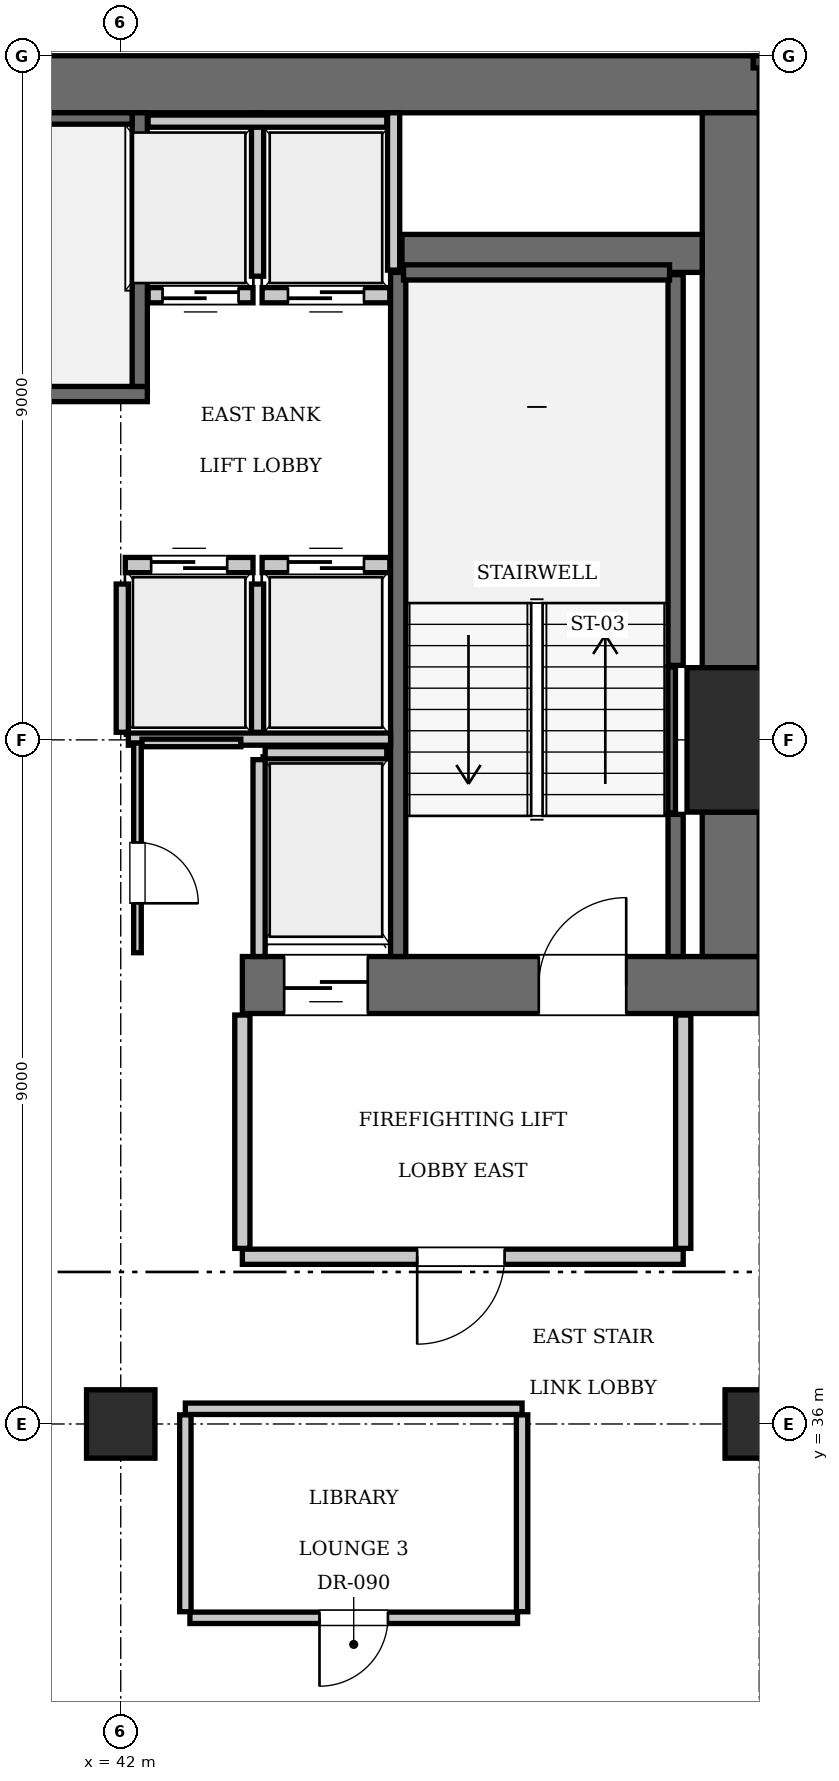
"""IFC4 building model, lengths in metres.
Left out: names, types, materials, properties, quantities, classifications, styles, units other than length and angle.
Written with IfcOpenShell. Run it as: python <this file> out.ifc"""

import sys

from ifc_helpers import new_model, si_unit, direction, frame, frame_2d, origin, origin_2d, place, context, subcontext, project, spatial, rectangle, extrude, element, fill, save


model = new_model("IFC4")
c1 = context("Model", 3, precision=1e-05, world=origin(), true_north=direction((0.0, 1.0)))
c2 = subcontext(c1, "Body", "Model", "MODEL_VIEW")
j1 = project(units=[si_unit("LENGTHUNIT", "METRE"), si_unit("PLANEANGLEUNIT", "RADIAN")], contexts=[c1])
p1 = place(None, origin())
s1 = spatial("IfcSite", under=j1, at=p1, CompositionType="ELEMENT")
p2 = place(p1, origin())
s2 = spatial("IfcBuilding", under=s1, at=p2, CompositionType="ELEMENT")
p3 = place(p2, frame((0.0, 0.0, 189.0)))
s3 = spatial("IfcBuildingStorey", under=s2, at=p3, CompositionType="ELEMENT", Elevation=189.0)
p4 = place(p3, frame((50.4, 45.0, 0.0), z_axis=(0.0, 0.0, 1.0), x_axis=(1.0, 0.0, 0.0)))
e1 = element("IfcColumn", 1, at=p4, inside=s3, PredefinedType="COLUMN", context=c2, shape_type="SweptSolid", body=[
    extrude(rectangle(XDim=1.9, YDim=1.9, at=origin_2d()), origin(), (0.0, 0.0, 1.0), 3.85),
])
p5 = place(p3, frame((25.2, 53.625, 0.0), z_axis=(0.0, 0.0, 1.0), x_axis=(1.0, 0.0, 0.0)))
e2 = element("IfcWall", 2, at=p5, inside=s3, PredefinedType="SHEAR", context=c2, shape_type="SweptSolid", body=[
    extrude(rectangle(XDim=25.2, YDim=0.75, at=frame_2d((12.6, 0.0))), origin(), (0.0, 0.0, 1.0), 3.85),
])
p6 = place(p3, frame((43.6, 41.775, 0.0), z_axis=(0.0, 0.0, 1.0), x_axis=(1.0, 0.0, 0.0)))
e3 = element("IfcWall", 3, at=p6, inside=s3, PredefinedType="SHEAR", context=c2, shape_type="SweptSolid", body=[
    extrude(rectangle(XDim=6.8, YDim=0.75, at=frame_2d((3.4, 0.0))), origin(), (0.0, 0.0, 1.0), 3.85),
])
p7 = place(p6, frame((3.9, 0.0, 0.0)))
e4 = element("IfcOpeningElement", 4, at=p7, cuts=e3, PredefinedType="OPENING", context=c2, shape_type="SweptSolid", body=[
    extrude(rectangle(XDim=1.15, YDim=2.15, at=frame_2d((0.575, 1.075))), frame((0.0, 0.385, 0.0), z_axis=(0.0, -1.0, 0.0), x_axis=(1.0, 0.0, 0.0)), (0.0, 0.0, 1.0), 0.77),
])
p8 = place(p6, frame((0.55, 0.0, 0.0)))
e5 = element("IfcOpeningElement", 5, at=p8, cuts=e3, PredefinedType="OPENING", context=c2, shape_type="SweptSolid", body=[
    extrude(rectangle(XDim=1.1, YDim=2.2, at=frame_2d((0.55, 1.1))), frame((0.0, 0.385, 0.0), z_axis=(0.0, -1.0, 0.0), x_axis=(1.0, 0.0, 0.0)), (0.0, 0.0, 1.0), 0.77),
])
p9 = place(p3, frame((50.025, 42.15, 0.0), z_axis=(0.0, 0.0, 1.0), x_axis=(0.0, 1.0, 0.0)))
e6 = element("IfcWall", 6, at=p9, inside=s3, PredefinedType="SHEAR", context=c2, shape_type="SweptSolid", body=[
    extrude(rectangle(XDim=1.9, YDim=0.75, at=frame_2d((0.95, 0.0))), origin(), (0.0, 0.0, 1.0), 3.85),
])
p10 = place(p3, frame((50.025, 45.95, 0.0), z_axis=(0.0, 0.0, 1.0), x_axis=(0.0, 1.0, 0.0)))
e7 = element("IfcWall", 7, at=p10, inside=s3, PredefinedType="SHEAR", context=c2, shape_type="SweptSolid", body=[
    extrude(rectangle(XDim=7.3, YDim=0.75, at=frame_2d((3.65, 0.0))), origin(), (0.0, 0.0, 1.0), 3.85),
])
p11 = place(p3, frame((45.7, 51.4, 0.0), z_axis=(0.0, 0.0, 1.0), x_axis=(1.0, 0.0, 0.0)))
e8 = element("IfcWall", 8, at=p11, inside=s3, PredefinedType="SHEAR", context=c2, shape_type="SweptSolid", body=[
    extrude(rectangle(XDim=3.95, YDim=0.5, at=frame_2d((1.975, 0.0))), origin(), (0.0, 0.0, 1.0), 3.85),
])
for number, where, z_axis, x_axis in (
    (9, (42.0, 36.0, 0.0), (0.0, 0.0, 1.0), (1.0, 0.0, 0.0)),
    (10, (50.4, 36.0, 0.0), (0.0, 0.0, 1.0), (1.0, 0.0, 0.0)),
):
    element("IfcColumn", number, at=place(p3, frame(where, z_axis=z_axis, x_axis=x_axis)), inside=s3, PredefinedType="COLUMN", context=c2, shape_type="SweptSolid", body=[
        extrude(rectangle(XDim=0.9, YDim=0.9, at=origin_2d()), origin(), (0.0, 0.0, 1.0), 3.85),
    ])
p12 = place(p3, frame((33.25, 49.55, 0.0), z_axis=(0.0, 0.0, 1.0), x_axis=(1.0, 0.0, 0.0)))
e11 = element("IfcWall", 11, at=p12, inside=s3, PredefinedType="SOLIDWALL", context=c2, shape_type="SweptSolid", body=[
    extrude(rectangle(XDim=9.1, YDim=0.2, at=frame_2d((4.55, 0.0))), origin(), (0.0, 0.0, 1.0), 3.61),
])
p13 = place(p3, frame((42.25, 49.65, 0.0), z_axis=(0.0, 0.0, 1.0), x_axis=(0.0, 1.0, 0.0)))
e12 = element("IfcWall", 12, at=p13, inside=s3, PredefinedType="SOLIDWALL", context=c2, shape_type="SweptSolid", body=[
    extrude(rectangle(XDim=3.6, YDim=0.2, at=frame_2d((1.8, 0.0))), origin(), (0.0, 0.0, 1.0), 3.61),
])
p14 = place(p3, frame((33.45, 53.175, 0.0), z_axis=(0.0, 0.0, 1.0), x_axis=(1.0, 0.0, 0.0)))
e13 = element("IfcWall", 13, at=p14, inside=s3, PredefinedType="SOLIDWALL", context=c2, shape_type="SweptSolid", body=[
    extrude(rectangle(XDim=8.7, YDim=0.15, at=frame_2d((4.35, 0.0))), origin(), (0.0, 0.0, 1.0), 3.61),
])
p15 = place(p3, frame((45.65, 42.15, 0.0), z_axis=(0.0, 0.0, 1.0), x_axis=(0.0, 1.0, 0.0)))
e14 = element("IfcWall", 14, at=p15, inside=s3, PredefinedType="SOLIDWALL", context=c2, shape_type="SweptSolid", body=[
    extrude(rectangle(XDim=9.0, YDim=0.2, at=frame_2d((4.5, 0.0))), origin(), (0.0, 0.0, 1.0), 3.61),
])
p16 = place(p3, frame((49.3, 42.15, 0.0), z_axis=(0.0, 0.0, 1.0), x_axis=(0.0, 1.0, 0.0)))
e15 = element("IfcWall", 15, at=p16, inside=s3, PredefinedType="SOLIDWALL", context=c2, shape_type="SweptSolid", body=[
    extrude(rectangle(XDim=1.87, YDim=0.2, at=frame_2d((0.935, 0.0))), origin(), (0.0, 0.0, 1.0), 3.61),
])
p17 = place(p3, frame((49.3, 45.98, 0.0), z_axis=(0.0, 0.0, 1.0), x_axis=(0.0, 1.0, 0.0)))
e16 = element("IfcWall", 16, at=p17, inside=s3, PredefinedType="SOLIDWALL", context=c2, shape_type="SweptSolid", body=[
    extrude(rectangle(XDim=5.14, YDim=0.2, at=frame_2d((2.57, 0.0))), origin(), (0.0, 0.0, 1.0), 3.61),
])
p18 = place(p3, frame((45.72, 51.15, 0.0), z_axis=(0.0, 0.0, 1.0), x_axis=(1.0, 0.0, 0.0)))
e17 = element("IfcWall", 17, at=p18, inside=s3, PredefinedType="SOLIDWALL", context=c2, shape_type="SweptSolid", body=[
    extrude(rectangle(XDim=3.5, YDim=0.2, at=frame_2d((1.75, 0.0))), origin(), (0.0, 0.0, 1.0), 3.61),
])
p19 = place(p3, frame((49.248, 44.04, 0.0), z_axis=(0.0, 0.0, 1.0), x_axis=(0.0, 1.0, 0.0)))
e18 = element("IfcWall", 18, at=p19, inside=s3, PredefinedType="SOLIDWALL", context=c2, shape_type="SweptSolid", body=[
    extrude(rectangle(XDim=1.92, YDim=0.1, at=frame_2d((0.96, 0.0))), origin(), (0.0, 0.0, 1.0), 3.61),
])
p20 = place(p3, frame((42.06, 47.3, 0.0), z_axis=(0.0, 0.0, 1.0), x_axis=(1.0, 0.0, 0.0)))
e19 = element("IfcWall", 19, at=p20, inside=s3, PredefinedType="SOLIDWALL", context=c2, shape_type="SweptSolid", body=[
    extrude(rectangle(XDim=1.68, YDim=0.2, at=frame_2d((0.84, 0.0))), origin(), (0.0, 0.0, 1.0), 3.61),
])
p21 = place(p20, frame((0.34, 0.0, 0.0)))
e20 = element("IfcOpeningElement", 20, at=p21, cuts=e19, PredefinedType="OPENING", context=c2, shape_type="SweptSolid", body=[
    extrude(rectangle(XDim=1.0, YDim=2.15, at=frame_2d((0.5, 1.075))), frame((0.0, 0.11, 0.0), z_axis=(0.0, -1.0, 0.0), x_axis=(1.0, 0.0, 0.0)), (0.0, 0.0, 1.0), 0.22),
])
p22 = place(p3, frame((43.86, 47.3, 0.0), z_axis=(0.0, 0.0, 1.0), x_axis=(1.0, 0.0, 0.0)))
e21 = element("IfcWall", 21, at=p22, inside=s3, PredefinedType="SOLIDWALL", context=c2, shape_type="SweptSolid", body=[
    extrude(rectangle(XDim=1.68, YDim=0.2, at=frame_2d((0.84, 0.0))), origin(), (0.0, 0.0, 1.0), 3.61),
])
p23 = place(p22, frame((0.34, 0.0, 0.0)))
e22 = element("IfcOpeningElement", 22, at=p23, cuts=e21, PredefinedType="OPENING", context=c2, shape_type="SweptSolid", body=[
    extrude(rectangle(XDim=1.0, YDim=2.15, at=frame_2d((0.5, 1.075))), frame((0.0, 0.11, 0.0), z_axis=(0.0, -1.0, 0.0), x_axis=(1.0, 0.0, 0.0)), (0.0, 0.0, 1.0), 0.22),
])
p24 = place(p3, frame((42.36, 50.85, 0.0), z_axis=(0.0, 0.0, 1.0), x_axis=(1.0, 0.0, 0.0)))
e23 = element("IfcWall", 23, at=p24, inside=s3, PredefinedType="SOLIDWALL", context=c2, shape_type="SweptSolid", body=[
    extrude(rectangle(XDim=1.38, YDim=0.2, at=frame_2d((0.69, 0.0))), origin(), (0.0, 0.0, 1.0), 3.61),
])
p25 = place(p24, frame((0.19, 0.0, 0.0)))
e24 = element("IfcOpeningElement", 24, at=p25, cuts=e23, PredefinedType="OPENING", context=c2, shape_type="SweptSolid", body=[
    extrude(rectangle(XDim=1.0, YDim=2.15, at=frame_2d((0.5, 1.075))), frame((0.0, 0.11, 0.0), z_axis=(0.0, -1.0, 0.0), x_axis=(1.0, 0.0, 0.0)), (0.0, 0.0, 1.0), 0.22),
])
p26 = place(p3, frame((43.86, 50.85, 0.0), z_axis=(0.0, 0.0, 1.0), x_axis=(1.0, 0.0, 0.0)))
e25 = element("IfcWall", 25, at=p26, inside=s3, PredefinedType="SOLIDWALL", context=c2, shape_type="SweptSolid", body=[
    extrude(rectangle(XDim=1.68, YDim=0.2, at=frame_2d((0.84, 0.0))), origin(), (0.0, 0.0, 1.0), 3.61),
])
p27 = place(p26, frame((0.34, 0.0, 0.0)))
e26 = element("IfcOpeningElement", 26, at=p27, cuts=e25, PredefinedType="OPENING", context=c2, shape_type="SweptSolid", body=[
    extrude(rectangle(XDim=1.0, YDim=2.15, at=frame_2d((0.5, 1.075))), frame((0.0, 0.11, 0.0), z_axis=(0.0, -1.0, 0.0), x_axis=(1.0, 0.0, 0.0)), (0.0, 0.0, 1.0), 0.22),
])
p28 = place(p3, frame((43.9, 44.83, 0.0), z_axis=(0.0, 0.0, 1.0), x_axis=(1.0, 0.0, 0.0)))
e27 = element("IfcWall", 27, at=p28, inside=s3, PredefinedType="SOLIDWALL", context=c2, shape_type="SweptSolid", body=[
    extrude(rectangle(XDim=1.6, YDim=0.16, at=frame_2d((0.8, 0.0))), origin(), (0.0, 0.0, 1.0), 3.61),
])
p29 = place(p3, frame((43.82, 42.15, 0.0), z_axis=(0.0, 0.0, 1.0), x_axis=(0.0, 1.0, 0.0)))
e28 = element("IfcWall", 28, at=p29, inside=s3, PredefinedType="SOLIDWALL", context=c2, shape_type="SweptSolid", body=[
    extrude(rectangle(XDim=2.59, YDim=0.16, at=frame_2d((1.295, 0.0))), origin(), (0.0, 0.0, 1.0), 3.61),
])
for number, where, z_axis, x_axis in (
    (29, (42.02, 45.1, 0.0), (0.0, 0.0, 1.0), (0.0, 1.0, 0.0)),
    (30, (43.8, 45.1, 0.0), (0.0, 0.0, 1.0), (0.0, 1.0, 0.0)),
):
    element("IfcWall", number, at=place(p3, frame(where, z_axis=z_axis, x_axis=x_axis)), inside=s3, PredefinedType="SOLIDWALL", context=c2, shape_type="SweptSolid", body=[
        extrude(rectangle(XDim=1.95, YDim=0.16, at=frame_2d((0.975, 0.0))), origin(), (0.0, 0.0, 1.0), 3.61),
    ])
p30 = place(p3, frame((42.1, 45.01, 0.0), z_axis=(0.0, 0.0, 1.0), x_axis=(1.0, 0.0, 0.0)))
e31 = element("IfcWall", 31, at=p30, inside=s3, PredefinedType="SOLIDWALL", context=c2, shape_type="SweptSolid", body=[
    extrude(rectangle(XDim=3.45, YDim=0.16, at=frame_2d((1.725, 0.0))), origin(), (0.0, 0.0, 1.0), 3.61),
])
p31 = place(p3, frame((45.59, 51.18, 0.0), z_axis=(0.0, 0.0, 1.0), x_axis=(0.0, 1.0, 0.0)))
e32 = element("IfcWall", 32, at=p31, inside=s3, PredefinedType="SOLIDWALL", context=c2, shape_type="SweptSolid", body=[
    extrude(rectangle(XDim=2.07, YDim=0.16, at=frame_2d((1.035, 0.0))), origin(), (0.0, 0.0, 1.0), 3.61),
])
p32 = place(p3, frame((43.8, 51.1, 0.0), z_axis=(0.0, 0.0, 1.0), x_axis=(0.0, 1.0, 0.0)))
e33 = element("IfcWall", 33, at=p32, inside=s3, PredefinedType="SOLIDWALL", context=c2, shape_type="SweptSolid", body=[
    extrude(rectangle(XDim=2.15, YDim=0.16, at=frame_2d((1.075, 0.0))), origin(), (0.0, 0.0, 1.0), 3.61),
])
p33 = place(p3, frame((42.36, 53.14, 0.0), z_axis=(0.0, 0.0, 1.0), x_axis=(1.0, 0.0, 0.0)))
e34 = element("IfcWall", 34, at=p33, inside=s3, PredefinedType="SOLIDWALL", context=c2, shape_type="SweptSolid", body=[
    extrude(rectangle(XDim=3.14, YDim=0.16, at=frame_2d((1.57, 0.0))), origin(), (0.0, 0.0, 1.0), 3.61),
])
p34 = place(p3, frame((43.6, 38.2, 0.0), z_axis=(0.0, 0.0, 1.0), x_axis=(1.0, 0.0, 0.0)))
e35 = element("IfcWall", 35, at=p34, inside=s3, PredefinedType="PARTITIONING", context=c2, shape_type="SweptSolid", body=[
    extrude(rectangle(XDim=5.8, YDim=0.2, at=frame_2d((2.9, 0.0))), origin(), (0.0, 0.0, 1.0), 3.61),
])
p35 = place(p34, frame((2.3, 0.0, 0.0)))
e36 = element("IfcOpeningElement", 36, at=p35, cuts=e35, PredefinedType="OPENING", context=c2, shape_type="SweptSolid", body=[
    extrude(rectangle(XDim=1.15, YDim=2.15, at=frame_2d((0.575, 1.075))), frame((0.0, 0.11, 0.0), z_axis=(0.0, -1.0, 0.0), x_axis=(1.0, 0.0, 0.0)), (0.0, 0.0, 1.0), 0.22),
])
for number, where, z_axis, x_axis in (
    (37, (43.6, 38.31, 0.0), (0.0, 0.0, 1.0), (0.0, 1.0, 0.0)),
    (38, (49.4, 38.31, 0.0), (0.0, 0.0, 1.0), (0.0, 1.0, 0.0)),
):
    element("IfcWall", number, at=place(p3, frame(where, z_axis=z_axis, x_axis=x_axis)), inside=s3, PredefinedType="PARTITIONING", context=c2, shape_type="SweptSolid", body=[
        extrude(rectangle(XDim=3.07, YDim=0.2, at=frame_2d((1.535, 0.0))), origin(), (0.0, 0.0, 1.0), 3.61),
    ])
p36 = place(p3, frame((42.22, 42.2, 0.0), z_axis=(0.0, 0.0, 1.0), x_axis=(0.0, 1.0, 0.0)))
e39 = element("IfcWall", 39, at=p36, inside=s3, PredefinedType="PARTITIONING", context=c2, shape_type="SweptSolid", body=[
    extrude(rectangle(XDim=2.76, YDim=0.1, at=frame_2d((1.38, 0.0))), origin(), (0.0, 0.0, 1.0), 3.61),
])
p37 = place(p36, frame((0.65, 0.0, 0.0)))
e40 = element("IfcOpeningElement", 40, at=p37, cuts=e39, PredefinedType="OPENING", context=c2, shape_type="SweptSolid", body=[
    extrude(rectangle(XDim=0.8, YDim=2.05, at=frame_2d((0.4, 1.025))), frame((0.0, 0.06, 0.0), z_axis=(0.0, -1.0, 0.0), x_axis=(1.0, 0.0, 0.0)), (0.0, 0.0, 1.0), 0.12),
])
p38 = place(p3, frame((42.28, 44.96, 0.0), z_axis=(0.0, 0.0, 1.0), x_axis=(1.0, 0.0, 0.0)))
e41 = element("IfcWall", 41, at=p38, inside=s3, PredefinedType="PARTITIONING", context=c2, shape_type="SweptSolid", body=[
    extrude(rectangle(XDim=1.3, YDim=0.1, at=frame_2d((0.65, 0.0))), origin(), (0.0, 0.0, 1.0), 3.61),
])
p39 = place(p3, frame((42.85, 36.2, 0.0), z_axis=(0.0, 0.0, 1.0), x_axis=(1.0, 0.0, 0.0)))
e42 = element("IfcWall", 42, at=p39, inside=s3, PredefinedType="PARTITIONING", context=c2, shape_type="SweptSolid", body=[
    extrude(rectangle(XDim=4.43, YDim=0.15, at=frame_2d((2.215, 0.0))), origin(), (0.0, 0.0, 1.0), 3.61),
])
for number, where, z_axis, x_axis in (
    (43, (42.85, 33.53, 0.0), (0.0, 0.0, 1.0), (0.0, 1.0, 0.0)),
    (44, (47.28, 33.53, 0.0), (0.0, 0.0, 1.0), (0.0, 1.0, 0.0)),
):
    element("IfcWall", number, at=place(p3, frame(where, z_axis=z_axis, x_axis=x_axis)), inside=s3, PredefinedType="PARTITIONING", context=c2, shape_type="SweptSolid", body=[
        extrude(rectangle(XDim=2.59, YDim=0.15, at=frame_2d((1.295, 0.0))), origin(), (0.0, 0.0, 1.0), 3.61),
    ])
p40 = place(p3, frame((42.91, 33.45, 0.0), z_axis=(0.0, 0.0, 1.0), x_axis=(1.0, 0.0, 0.0)))
e45 = element("IfcWall", 45, at=p40, inside=s3, PredefinedType="PARTITIONING", context=c2, shape_type="SweptSolid", body=[
    extrude(rectangle(XDim=4.31, YDim=0.15, at=frame_2d((2.155, 0.0))), origin(), (0.0, 0.0, 1.0), 3.61),
])
p41 = place(p40, frame((1.705, 0.0, 0.0)))
e46 = element("IfcOpeningElement", 46, at=p41, cuts=e45, PredefinedType="OPENING", context=c2, shape_type="SweptSolid", body=[
    extrude(rectangle(XDim=0.9, YDim=2.1, at=frame_2d((0.45, 1.05))), frame((0.0, 0.085, 0.0), z_axis=(0.0, -1.0, 0.0), x_axis=(1.0, 0.0, 0.0)), (0.0, 0.0, 1.0), 0.17),
])
p42 = place(p7, origin())
e47 = element("IfcDoor", 47, at=p42, inside=s3, OperationType="SINGLE_SWING_RIGHT", PredefinedType="DOOR", context=c2, shape_type="SweptSolid", body=[
    extrude(rectangle(XDim=1.15, YDim=2.15, at=frame_2d((0.575, 1.075))), frame((0.0, 0.025, 0.0), z_axis=(0.0, -1.0, 0.0), x_axis=(1.0, 0.0, 0.0)), (0.0, 0.0, 1.0), 0.05),
])
fill(e4, e47)
p43 = place(p21, origin())
e48 = element("IfcDoor", 48, at=p43, inside=s3, OperationType="SLIDING_TO_LEFT", PredefinedType="DOOR", context=c2, shape_type="SweptSolid", body=[
    extrude(rectangle(XDim=1.0, YDim=2.15, at=frame_2d((0.5, 1.075))), frame((0.0, 0.025, 0.0), z_axis=(0.0, -1.0, 0.0), x_axis=(1.0, 0.0, 0.0)), (0.0, 0.0, 1.0), 0.05),
])
fill(e20, e48)
p44 = place(p23, origin())
e49 = element("IfcDoor", 49, at=p44, inside=s3, OperationType="SLIDING_TO_LEFT", PredefinedType="DOOR", context=c2, shape_type="SweptSolid", body=[
    extrude(rectangle(XDim=1.0, YDim=2.15, at=frame_2d((0.5, 1.075))), frame((0.0, 0.025, 0.0), z_axis=(0.0, -1.0, 0.0), x_axis=(1.0, 0.0, 0.0)), (0.0, 0.0, 1.0), 0.05),
])
fill(e22, e49)
p45 = place(p25, frame((1.0, 0.0, 0.0), z_axis=(0.0, 0.0, 1.0), x_axis=(-1.0, 0.0, 0.0)))
e50 = element("IfcDoor", 50, at=p45, inside=s3, OperationType="SLIDING_TO_LEFT", PredefinedType="DOOR", context=c2, shape_type="SweptSolid", body=[
    extrude(rectangle(XDim=1.0, YDim=2.15, at=frame_2d((0.5, 1.075))), frame((0.0, 0.025, 0.0), z_axis=(0.0, -1.0, 0.0), x_axis=(1.0, 0.0, 0.0)), (0.0, 0.0, 1.0), 0.05),
])
fill(e24, e50)
p46 = place(p27, frame((1.0, 0.0, 0.0), z_axis=(0.0, 0.0, 1.0), x_axis=(-1.0, 0.0, 0.0)))
e51 = element("IfcDoor", 51, at=p46, inside=s3, OperationType="SLIDING_TO_LEFT", PredefinedType="DOOR", context=c2, shape_type="SweptSolid", body=[
    extrude(rectangle(XDim=1.0, YDim=2.15, at=frame_2d((0.5, 1.075))), frame((0.0, 0.025, 0.0), z_axis=(0.0, -1.0, 0.0), x_axis=(1.0, 0.0, 0.0)), (0.0, 0.0, 1.0), 0.05),
])
fill(e26, e51)
p47 = place(p8, frame((1.1, 0.0, 0.0), z_axis=(0.0, 0.0, 1.0), x_axis=(-1.0, 0.0, 0.0)))
e52 = element("IfcDoor", 52, at=p47, inside=s3, OperationType="SLIDING_TO_LEFT", PredefinedType="DOOR", context=c2, shape_type="SweptSolid", body=[
    extrude(rectangle(XDim=1.1, YDim=2.2, at=frame_2d((0.55, 1.1))), frame((0.0, 0.025, 0.0), z_axis=(0.0, -1.0, 0.0), x_axis=(1.0, 0.0, 0.0)), (0.0, 0.0, 1.0), 0.05),
])
fill(e5, e52)
p48 = place(p35, frame((1.15, 0.0, 0.0), z_axis=(0.0, 0.0, 1.0), x_axis=(-1.0, 0.0, 0.0)))
e53 = element("IfcDoor", 53, at=p48, inside=s3, OperationType="SINGLE_SWING_RIGHT", PredefinedType="DOOR", context=c2, shape_type="SweptSolid", body=[
    extrude(rectangle(XDim=1.15, YDim=2.15, at=frame_2d((0.575, 1.075))), frame((0.0, 0.025, 0.0), z_axis=(0.0, -1.0, 0.0), x_axis=(1.0, 0.0, 0.0)), (0.0, 0.0, 1.0), 0.05),
])
fill(e36, e53)
p49 = place(p37, frame((0.8, 0.0, 0.0), z_axis=(0.0, 0.0, 1.0), x_axis=(-1.0, 0.0, 0.0)))
e54 = element("IfcDoor", 54, at=p49, inside=s3, OperationType="SINGLE_SWING_RIGHT", PredefinedType="DOOR", context=c2, shape_type="SweptSolid", body=[
    extrude(rectangle(XDim=0.8, YDim=2.05, at=frame_2d((0.4, 1.025))), frame((0.0, 0.025, 0.0), z_axis=(0.0, -1.0, 0.0), x_axis=(1.0, 0.0, 0.0)), (0.0, 0.0, 1.0), 0.05),
])
fill(e40, e54)
p50 = place(p41, frame((0.9, 0.0, 0.0), z_axis=(0.0, 0.0, 1.0), x_axis=(-1.0, 0.0, 0.0)))
e55 = element("IfcDoor", 55, at=p50, inside=s3, OperationType="SINGLE_SWING_RIGHT", PredefinedType="DOOR", context=c2, shape_type="SweptSolid", body=[
    extrude(rectangle(XDim=0.9, YDim=2.1, at=frame_2d((0.45, 1.05))), frame((0.0, 0.025, 0.0), z_axis=(0.0, -1.0, 0.0), x_axis=(1.0, 0.0, 0.0)), (0.0, 0.0, 1.0), 0.05),
])
fill(e46, e55)
save(model, sys.argv[1])
